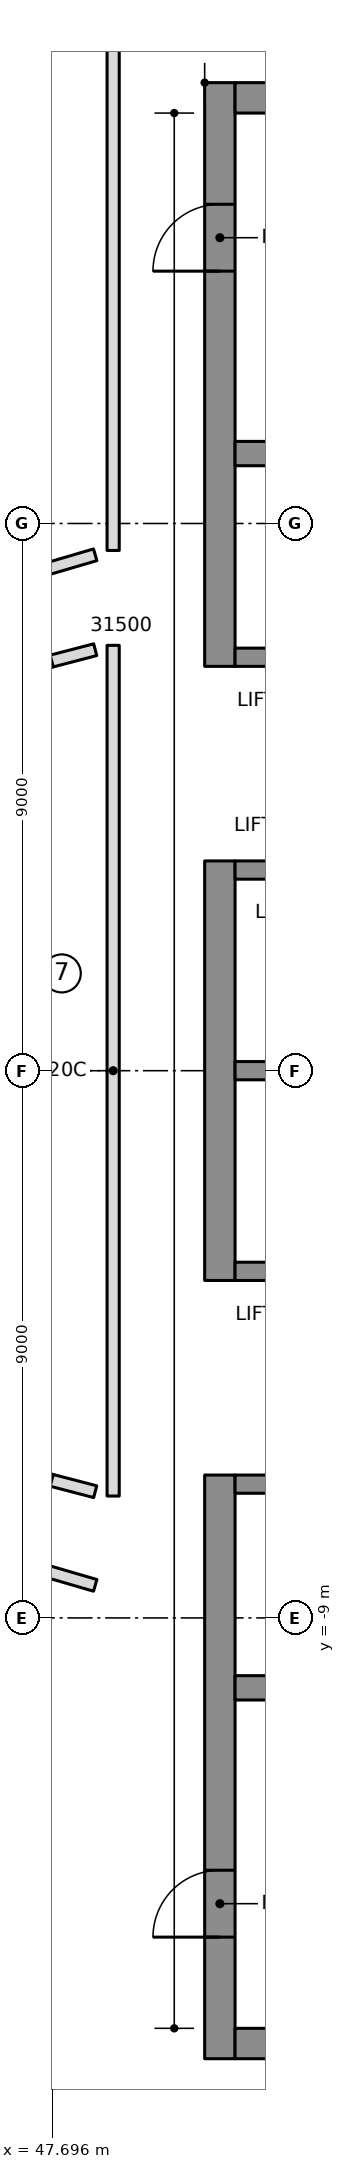
"""IFC4 building model, lengths in metres.
Left out: names, types, materials, properties, quantities, classifications, styles, units other than length and angle.
Written with IfcOpenShell. Run it as: python <this file> out.ifc"""

import sys

from ifc_helpers import new_model, si_unit, direction, frame, frame_2d, origin, place, context, subcontext, project, spatial, rectangle, extrude, element, fill, save


model = new_model("IFC4")
c1 = context("Model", 3, precision=1e-05, world=origin(), true_north=direction((0.0, 1.0)))
c2 = subcontext(c1, "Body", "Model", "MODEL_VIEW")
j1 = project(units=[si_unit("LENGTHUNIT", "METRE"), si_unit("PLANEANGLEUNIT", "RADIAN")], contexts=[c1])
p1 = place(None, origin())
s1 = spatial("IfcSite", under=j1, at=p1, CompositionType="ELEMENT")
p2 = place(p1, origin())
s2 = spatial("IfcBuilding", under=s1, at=p2, CompositionType="ELEMENT")
p3 = place(p2, frame((0.0, 0.0, 282.1)))
s3 = spatial("IfcBuildingStorey", under=s2, at=p3, CompositionType="ELEMENT", Elevation=282.1)
p4 = place(p3, frame((50.45, 6.65, 0.0), z_axis=(0.0, 0.0, 1.0), x_axis=(0.0, 1.0, 0.0)))
e1 = element("IfcWall", 1, at=p4, inside=s3, PredefinedType="SHEAR", context=c2, shape_type="SweptSolid", body=[
    extrude(rectangle(XDim=9.6, YDim=0.5, at=frame_2d((4.8, 0.0))), origin(), (0.0, 0.0, 1.0), 3.55),
])
p5 = place(p4, frame((6.5, 0.0, 0.0)))
e2 = element("IfcOpeningElement", 2, at=p5, cuts=e1, PredefinedType="OPENING", context=c2, shape_type="SweptSolid", body=[
    extrude(rectangle(XDim=1.1, YDim=2.1, at=frame_2d((0.55, 1.05))), frame((0.0, 0.26, 0.0), z_axis=(0.0, -1.0, 0.0), x_axis=(1.0, 0.0, 0.0)), (0.0, 0.0, 1.0), 0.52),
])
p6 = place(p3, frame((50.45, -3.45, 0.0), z_axis=(0.0, 0.0, 1.0), x_axis=(0.0, 1.0, 0.0)))
e3 = element("IfcWall", 3, at=p6, inside=s3, PredefinedType="SHEAR", context=c2, shape_type="SweptSolid", body=[
    extrude(rectangle(XDim=6.9, YDim=0.5, at=frame_2d((3.45, 0.0))), origin(), (0.0, 0.0, 1.0), 3.55),
])
p7 = place(p3, frame((50.45, -16.25, 0.0), z_axis=(0.0, 0.0, 1.0), x_axis=(0.0, 1.0, 0.0)))
e4 = element("IfcWall", 4, at=p7, inside=s3, PredefinedType="SHEAR", context=c2, shape_type="SweptSolid", body=[
    extrude(rectangle(XDim=9.6, YDim=0.5, at=frame_2d((4.8, 0.0))), origin(), (0.0, 0.0, 1.0), 3.55),
])
p8 = place(p7, frame((2.0, 0.0, 0.0)))
e5 = element("IfcOpeningElement", 5, at=p8, cuts=e4, PredefinedType="OPENING", context=c2, shape_type="SweptSolid", body=[
    extrude(rectangle(XDim=1.1, YDim=2.1, at=frame_2d((0.55, 1.05))), frame((0.0, 0.26, 0.0), z_axis=(0.0, -1.0, 0.0), x_axis=(1.0, 0.0, 0.0)), (0.0, 0.0, 1.0), 0.52),
])
for number, where, z_axis, x_axis in (
    (6, (50.7, 16.0, 0.0), (0.0, 0.0, 1.0), (1.0, 0.0, 0.0)),
    (7, (50.7, -16.0, 0.0), (0.0, 0.0, 1.0), (1.0, 0.0, 0.0)),
):
    element("IfcWall", number, at=place(p3, frame(where, z_axis=z_axis, x_axis=x_axis)), inside=s3, PredefinedType="SHEAR", context=c2, shape_type="SweptSolid", body=[
        extrude(rectangle(XDim=13.52, YDim=0.5, at=frame_2d((6.76, 0.0))), origin(), (0.0, 0.0, 1.0), 3.55),
    ])
p9 = place(p3, frame((50.7, 10.15, 0.0), z_axis=(0.0, 0.0, 1.0), x_axis=(1.0, 0.0, 0.0)))
e8 = element("IfcWall", 8, at=p9, inside=s3, PredefinedType="SHEAR", context=c2, shape_type="SweptSolid", body=[
    extrude(rectangle(XDim=13.02, YDim=0.4, at=frame_2d((6.51, 0.0))), origin(), (0.0, 0.0, 1.0), 3.55),
])
p10 = place(p9, frame((0.7, 0.0, 0.0)))
e9 = element("IfcOpeningElement", 9, at=p10, cuts=e8, PredefinedType="OPENING", context=c2, shape_type="SweptSolid", body=[
    extrude(rectangle(XDim=1.1, YDim=2.1, at=frame_2d((0.55, 1.05))), frame((0.0, 0.21, 0.0), z_axis=(0.0, -1.0, 0.0), x_axis=(1.0, 0.0, 0.0)), (0.0, 0.0, 1.0), 0.42),
])
p11 = place(p9, frame((3.5, 0.0, 0.0)))
e10 = element("IfcOpeningElement", 10, at=p11, cuts=e8, PredefinedType="OPENING", context=c2, shape_type="SweptSolid", body=[
    extrude(rectangle(XDim=1.1, YDim=2.1, at=frame_2d((0.55, 1.05))), frame((0.0, 0.21, 0.0), z_axis=(0.0, -1.0, 0.0), x_axis=(1.0, 0.0, 0.0)), (0.0, 0.0, 1.0), 0.42),
])
p12 = place(p3, frame((50.7, -10.15, 0.0), z_axis=(0.0, 0.0, 1.0), x_axis=(1.0, 0.0, 0.0)))
e11 = element("IfcWall", 11, at=p12, inside=s3, PredefinedType="SHEAR", context=c2, shape_type="SweptSolid", body=[
    extrude(rectangle(XDim=13.02, YDim=0.4, at=frame_2d((6.51, 0.0))), origin(), (0.0, 0.0, 1.0), 3.55),
])
p13 = place(p3, frame((50.7, 0.0, 0.0), z_axis=(0.0, 0.0, 1.0), x_axis=(1.0, 0.0, 0.0)))
e12 = element("IfcWall", 12, at=p13, inside=s3, PredefinedType="SHEAR", context=c2, shape_type="SweptSolid", body=[
    extrude(rectangle(XDim=10.9, YDim=0.3, at=frame_2d((5.45, 0.0))), origin(), (0.0, 0.0, 1.0), 3.55),
])
p14 = place(p3, frame((50.7, 3.3, 0.0), z_axis=(0.0, 0.0, 1.0), x_axis=(1.0, 0.0, 0.0)))
e13 = element("IfcWall", 13, at=p14, inside=s3, PredefinedType="SHEAR", context=c2, shape_type="SweptSolid", body=[
    extrude(rectangle(XDim=10.9, YDim=0.3, at=frame_2d((5.45, 0.0))), origin(), (0.0, 0.0, 1.0), 3.55),
])
p15 = place(p14, frame((0.7, 0.0, 0.0)))
e14 = element("IfcOpeningElement", 14, at=p15, cuts=e13, PredefinedType="OPENING", context=c2, shape_type="SweptSolid", body=[
    extrude(rectangle(XDim=1.1, YDim=2.1, at=frame_2d((0.55, 1.05))), frame((0.0, 0.16, 0.0), z_axis=(0.0, -1.0, 0.0), x_axis=(1.0, 0.0, 0.0)), (0.0, 0.0, 1.0), 0.32),
])
p16 = place(p14, frame((3.5, 0.0, 0.0)))
e15 = element("IfcOpeningElement", 15, at=p16, cuts=e13, PredefinedType="OPENING", context=c2, shape_type="SweptSolid", body=[
    extrude(rectangle(XDim=1.1, YDim=2.1, at=frame_2d((0.55, 1.05))), frame((0.0, 0.16, 0.0), z_axis=(0.0, -1.0, 0.0), x_axis=(1.0, 0.0, 0.0)), (0.0, 0.0, 1.0), 0.32),
])
p17 = place(p14, frame((6.4, 0.0, 0.0)))
e16 = element("IfcOpeningElement", 16, at=p17, cuts=e13, PredefinedType="OPENING", context=c2, shape_type="SweptSolid", body=[
    extrude(rectangle(XDim=0.9, YDim=2.1, at=frame_2d((0.45, 1.05))), frame((0.0, 0.16, 0.0), z_axis=(0.0, -1.0, 0.0), x_axis=(1.0, 0.0, 0.0)), (0.0, 0.0, 1.0), 0.32),
])
p18 = place(p14, frame((9.2, 0.0, 0.0)))
e17 = element("IfcOpeningElement", 17, at=p18, cuts=e13, PredefinedType="OPENING", context=c2, shape_type="SweptSolid", body=[
    extrude(rectangle(XDim=0.9, YDim=2.1, at=frame_2d((0.45, 1.05))), frame((0.0, 0.16, 0.0), z_axis=(0.0, -1.0, 0.0), x_axis=(1.0, 0.0, 0.0)), (0.0, 0.0, 1.0), 0.32),
])
p19 = place(p3, frame((50.7, 6.8, 0.0), z_axis=(0.0, 0.0, 1.0), x_axis=(1.0, 0.0, 0.0)))
e18 = element("IfcWall", 18, at=p19, inside=s3, PredefinedType="SHEAR", context=c2, shape_type="SweptSolid", body=[
    extrude(rectangle(XDim=10.9, YDim=0.3, at=frame_2d((5.45, 0.0))), origin(), (0.0, 0.0, 1.0), 3.55),
])
p20 = place(p19, frame((6.4, 0.0, 0.0)))
e19 = element("IfcOpeningElement", 19, at=p20, cuts=e18, PredefinedType="OPENING", context=c2, shape_type="SweptSolid", body=[
    extrude(rectangle(XDim=0.9, YDim=2.1, at=frame_2d((0.45, 1.05))), frame((0.0, 0.16, 0.0), z_axis=(0.0, -1.0, 0.0), x_axis=(1.0, 0.0, 0.0)), (0.0, 0.0, 1.0), 0.32),
])
p21 = place(p19, frame((9.2, 0.0, 0.0)))
e20 = element("IfcOpeningElement", 20, at=p21, cuts=e18, PredefinedType="OPENING", context=c2, shape_type="SweptSolid", body=[
    extrude(rectangle(XDim=0.9, YDim=2.1, at=frame_2d((0.45, 1.05))), frame((0.0, 0.16, 0.0), z_axis=(0.0, -1.0, 0.0), x_axis=(1.0, 0.0, 0.0)), (0.0, 0.0, 1.0), 0.32),
])
p22 = place(p3, frame((50.7, -3.3, 0.0), z_axis=(0.0, 0.0, 1.0), x_axis=(1.0, 0.0, 0.0)))
e21 = element("IfcWall", 21, at=p22, inside=s3, PredefinedType="SHEAR", context=c2, shape_type="SweptSolid", body=[
    extrude(rectangle(XDim=10.9, YDim=0.3, at=frame_2d((5.45, 0.0))), origin(), (0.0, 0.0, 1.0), 3.55),
])
p23 = place(p22, frame((9.1, 0.0, 0.0)))
e22 = element("IfcOpeningElement", 22, at=p23, cuts=e21, PredefinedType="OPENING", context=c2, shape_type="SweptSolid", body=[
    extrude(rectangle(XDim=1.1, YDim=2.1, at=frame_2d((0.55, 1.05))), frame((0.0, 0.16, 0.0), z_axis=(0.0, -1.0, 0.0), x_axis=(1.0, 0.0, 0.0)), (0.0, 0.0, 1.0), 0.32),
])
p24 = place(p3, frame((50.7, -6.8, 0.0), z_axis=(0.0, 0.0, 1.0), x_axis=(1.0, 0.0, 0.0)))
e23 = element("IfcWall", 23, at=p24, inside=s3, PredefinedType="SHEAR", context=c2, shape_type="SweptSolid", body=[
    extrude(rectangle(XDim=10.9, YDim=0.3, at=frame_2d((5.45, 0.0))), origin(), (0.0, 0.0, 1.0), 3.55),
])
p25 = place(p24, frame((6.3, 0.0, 0.0)))
e24 = element("IfcOpeningElement", 24, at=p25, cuts=e23, PredefinedType="OPENING", context=c2, shape_type="SweptSolid", body=[
    extrude(rectangle(XDim=1.1, YDim=2.1, at=frame_2d((0.55, 1.05))), frame((0.0, 0.16, 0.0), z_axis=(0.0, -1.0, 0.0), x_axis=(1.0, 0.0, 0.0)), (0.0, 0.0, 1.0), 0.32),
])
p26 = place(p24, frame((9.1, 0.0, 0.0)))
e25 = element("IfcOpeningElement", 25, at=p26, cuts=e23, PredefinedType="OPENING", context=c2, shape_type="SweptSolid", body=[
    extrude(rectangle(XDim=1.1, YDim=2.1, at=frame_2d((0.55, 1.05))), frame((0.0, 0.16, 0.0), z_axis=(0.0, -1.0, 0.0), x_axis=(1.0, 0.0, 0.0)), (0.0, 0.0, 1.0), 0.32),
])
p27 = place(p24, frame((0.8, 0.0, 0.0)))
e26 = element("IfcOpeningElement", 26, at=p27, cuts=e23, PredefinedType="OPENING", context=c2, shape_type="SweptSolid", body=[
    extrude(rectangle(XDim=0.9, YDim=2.1, at=frame_2d((0.45, 1.05))), frame((0.0, 0.16, 0.0), z_axis=(0.0, -1.0, 0.0), x_axis=(1.0, 0.0, 0.0)), (0.0, 0.0, 1.0), 0.32),
])
p28 = place(p24, frame((3.6, 0.0, 0.0)))
e27 = element("IfcOpeningElement", 27, at=p28, cuts=e23, PredefinedType="OPENING", context=c2, shape_type="SweptSolid", body=[
    extrude(rectangle(XDim=0.9, YDim=2.1, at=frame_2d((0.45, 1.05))), frame((0.0, 0.16, 0.0), z_axis=(0.0, -1.0, 0.0), x_axis=(1.0, 0.0, 0.0)), (0.0, 0.0, 1.0), 0.32),
])
p29 = place(p3, frame((43.918, 5.675, 0.0), z_axis=(0.0, 0.0, 1.0), x_axis=(0.962411212211, 0.271596499628, 0.0)))
e28 = element("IfcWall", 28, at=p29, inside=s3, PredefinedType="PARTITIONING", context=c2, shape_type="SweptSolid", body=[
    extrude(rectangle(XDim=3.913, YDim=0.2, at=frame_2d((1.957, 0.0))), origin(), (0.0, 0.0, 1.0), 3.25),
])
p30 = place(p29, frame((1.457, 0.0, 0.0)))
e29 = element("IfcOpeningElement", 29, at=p30, cuts=e28, PredefinedType="OPENING", context=c2, shape_type="SweptSolid", body=[
    extrude(rectangle(XDim=1.0, YDim=2.1, at=frame_2d((0.5, 1.05))), frame((0.0, 0.11, 0.0), z_axis=(0.0, -1.0, 0.0), x_axis=(1.0, 0.0, 0.0)), (0.0, 0.0, 1.0), 0.22),
])
p31 = place(p3, frame((47.684, -6.738, 0.0), z_axis=(0.0, 0.0, 1.0), x_axis=(-0.962411212211, 0.271596499628, 0.0)))
e30 = element("IfcWall", 30, at=p31, inside=s3, PredefinedType="PARTITIONING", context=c2, shape_type="SweptSolid", body=[
    extrude(rectangle(XDim=3.913, YDim=0.2, at=frame_2d((1.957, 0.0))), origin(), (0.0, 0.0, 1.0), 3.25),
])
p32 = place(p3, frame((48.4, 8.485, 0.0), z_axis=(0.0, 0.0, 1.0), x_axis=(-0.959461783262, -0.281838759682, 0.0)))
e31 = element("IfcWall", 31, at=p32, inside=s3, PredefinedType="PARTITIONING", context=c2, shape_type="SweptSolid", body=[
    extrude(rectangle(XDim=10.694, YDim=0.2, at=frame_2d((5.347, 0.0))), origin(), (0.0, 0.0, 1.0), 3.25),
])
p33 = place(p32, frame((4.847, 0.0, 0.0)))
e32 = element("IfcOpeningElement", 32, at=p33, cuts=e31, PredefinedType="OPENING", context=c2, shape_type="SweptSolid", body=[
    extrude(rectangle(XDim=1.0, YDim=2.1, at=frame_2d((0.5, 1.05))), frame((0.0, 0.11, 0.0), z_axis=(0.0, -1.0, 0.0), x_axis=(1.0, 0.0, 0.0)), (0.0, 0.0, 1.0), 0.22),
])
p34 = place(p3, frame((38.14, -5.471, 0.0), z_axis=(0.0, 0.0, 1.0), x_axis=(0.95996673497, -0.280114026339, 0.0)))
e33 = element("IfcWall", 33, at=p34, inside=s3, PredefinedType="PARTITIONING", context=c2, shape_type="SweptSolid", body=[
    extrude(rectangle(XDim=10.688, YDim=0.2, at=frame_2d((5.344, 0.0))), origin(), (0.0, 0.0, 1.0), 3.25),
])
p35 = place(p34, frame((3.7, 0.0, 0.0)))
e34 = element("IfcOpeningElement", 34, at=p35, cuts=e33, PredefinedType="OPENING", context=c2, shape_type="SweptSolid", body=[
    extrude(rectangle(XDim=1.0, YDim=2.1, at=frame_2d((0.5, 1.05))), frame((0.0, 0.11, 0.0), z_axis=(0.0, -1.0, 0.0), x_axis=(1.0, 0.0, 0.0)), (0.0, 0.0, 1.0), 0.22),
])
for number, where, z_axis, x_axis in (
    (35, (47.684, 6.738, 0.0), (0.0, 0.0, 1.0), (0.968, 0.253, 0.0)),
    (36, (48.4, -6.924, 0.0), (0.0, 0.0, 1.0), (-0.968, 0.253, 0.0)),
):
    element("IfcWall", number, at=place(p3, frame(where, z_axis=z_axis, x_axis=x_axis)), inside=s3, PredefinedType="PARTITIONING", context=c2, shape_type="SweptSolid", body=[
        extrude(rectangle(XDim=0.74, YDim=0.2, at=frame_2d((0.37, 0.0))), origin(), (0.0, 0.0, 1.0), 3.25),
    ])
p36 = place(p3, frame((48.695, 6.996, 0.0), z_axis=(0.0, 0.0, 1.0), x_axis=(0.0, -1.0, 0.0)))
e37 = element("IfcWall", 37, at=p36, inside=s3, PredefinedType="PARTITIONING", context=c2, shape_type="SweptSolid", body=[
    extrude(rectangle(XDim=13.992, YDim=0.2, at=frame_2d((6.996, 0.0))), origin(), (0.0, 0.0, 1.0), 3.25),
])
p37 = place(p3, frame((48.695, 18.553, 0.0), z_axis=(0.0, 0.0, 1.0), x_axis=(0.0, -1.0, 0.0)))
e38 = element("IfcWall", 38, at=p37, inside=s3, PredefinedType="PARTITIONING", context=c2, shape_type="SweptSolid", body=[
    extrude(rectangle(XDim=9.997, YDim=0.2, at=frame_2d((4.998, 0.0))), origin(), (0.0, 0.0, 1.0), 3.25),
])
p38 = place(p5, origin())
e39 = element("IfcDoor", 39, at=p38, inside=s3, OperationType="SINGLE_SWING_RIGHT", PredefinedType="DOOR", context=c2, shape_type="SweptSolid", body=[
    extrude(rectangle(XDim=1.1, YDim=2.1, at=frame_2d((0.55, 1.05))), frame((0.0, 0.025, 0.0), z_axis=(0.0, -1.0, 0.0), x_axis=(1.0, 0.0, 0.0)), (0.0, 0.0, 1.0), 0.05),
])
fill(e2, e39)
p39 = place(p8, origin())
e40 = element("IfcDoor", 40, at=p39, inside=s3, OperationType="SINGLE_SWING_RIGHT", PredefinedType="DOOR", context=c2, shape_type="SweptSolid", body=[
    extrude(rectangle(XDim=1.1, YDim=2.1, at=frame_2d((0.55, 1.05))), frame((0.0, 0.025, 0.0), z_axis=(0.0, -1.0, 0.0), x_axis=(1.0, 0.0, 0.0)), (0.0, 0.0, 1.0), 0.05),
])
fill(e5, e40)
save(model, sys.argv[1])
